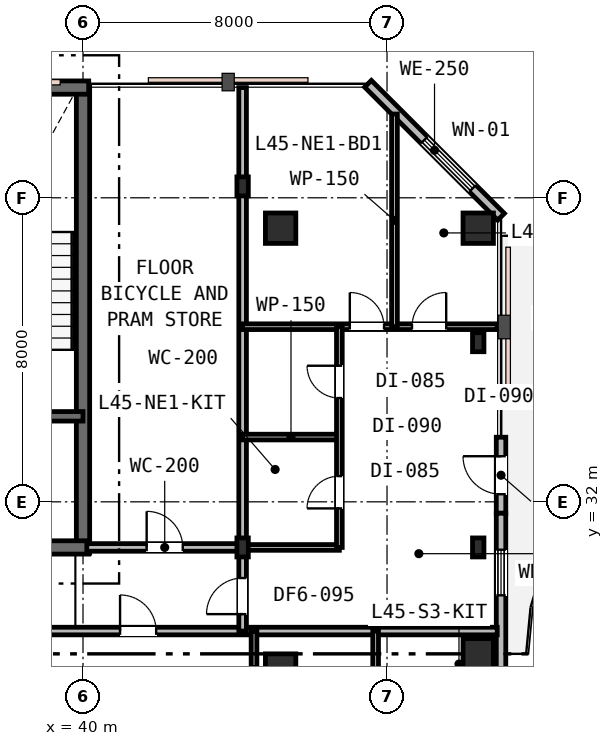
"""IFC4 building model, lengths in metres.
Left out: names, types, materials, properties, quantities, classifications, styles, units other than length and angle.
Written with IfcOpenShell. Run it as: python <this file> out.ifc"""

import sys

from ifc_helpers import new_model, si_unit, direction, frame, frame_2d, origin, origin_2d, place, context, subcontext, project, spatial, rectangle, i_section, extrude, element, fill, save


model = new_model("IFC4")
c1 = context("Model", 3, precision=1e-05, world=origin(), true_north=direction((0.0, 1.0)))
c2 = subcontext(c1, "Body", "Model", "MODEL_VIEW")
j1 = project(units=[si_unit("LENGTHUNIT", "METRE"), si_unit("PLANEANGLEUNIT", "RADIAN")], contexts=[c1])
p1 = place(None, origin())
s1 = spatial("IfcSite", under=j1, at=p1, CompositionType="ELEMENT")
p2 = place(p1, origin())
s2 = spatial("IfcBuilding", under=s1, at=p2, CompositionType="ELEMENT")
p3 = place(p2, frame((0.0, 0.0, 175.8)))
s3 = spatial("IfcBuildingStorey", under=s2, at=p3, CompositionType="ELEMENT", Elevation=175.8)
p4 = place(p3, frame((40.0, 30.65, 0.0), z_axis=(0.0, 0.0, 1.0), x_axis=(0.0, 1.0, 0.0)))
e1 = element("IfcWall", 1, at=p4, inside=s3, PredefinedType="SHEAR", context=c2, shape_type="SweptSolid", body=[
    extrude(rectangle(XDim=12.3, YDim=0.35, at=frame_2d((6.15, 0.0))), origin(), (0.0, 0.0, 1.0), 3.6),
])
p5 = place(p3, frame((15.85, 42.9, 0.0), z_axis=(0.0, 0.0, 1.0), x_axis=(1.0, 0.0, 0.0)))
e2 = element("IfcWall", 2, at=p5, inside=s3, PredefinedType="SHEAR", context=c2, shape_type="SweptSolid", body=[
    extrude(rectangle(XDim=24.3, YDim=0.35, at=frame_2d((12.15, 0.0))), origin(), (0.0, 0.0, 1.0), 3.6),
])
p6 = place(p5, frame((1.6, 0.0, 0.95)))
e3 = element("IfcOpeningElement", 3, at=p6, cuts=e2, PredefinedType="OPENING", context=c2, shape_type="SweptSolid", body=[
    extrude(rectangle(XDim=1.2, YDim=1.6, at=frame_2d((0.6, 0.8))), frame((0.0, 0.185, 0.0), z_axis=(0.0, -1.0, 0.0), x_axis=(1.0, 0.0, 0.0)), (0.0, 0.0, 1.0), 0.37),
])
p7 = place(p5, frame((16.5, 0.0, 0.95)))
e4 = element("IfcOpeningElement", 4, at=p7, cuts=e2, PredefinedType="OPENING", context=c2, shape_type="SweptSolid", body=[
    extrude(rectangle(XDim=1.2, YDim=1.6, at=frame_2d((0.6, 0.8))), frame((0.0, 0.185, 0.0), z_axis=(0.0, -1.0, 0.0), x_axis=(1.0, 0.0, 0.0)), (0.0, 0.0, 1.0), 0.37),
])
p8 = place(p5, frame((21.6, 0.0, 0.95)))
e5 = element("IfcOpeningElement", 5, at=p8, cuts=e2, PredefinedType="OPENING", context=c2, shape_type="SweptSolid", body=[
    extrude(rectangle(XDim=1.2, YDim=1.6, at=frame_2d((0.6, 0.8))), frame((0.0, 0.185, 0.0), z_axis=(0.0, -1.0, 0.0), x_axis=(1.0, 0.0, 0.0)), (0.0, 0.0, 1.0), 0.37),
])
p9 = place(p3, frame((28.95, 30.8, 0.0), z_axis=(0.0, 0.0, 1.0), x_axis=(1.0, 0.0, 0.0)))
e6 = element("IfcWall", 6, at=p9, inside=s3, PredefinedType="SHEAR", context=c2, shape_type="SweptSolid", body=[
    extrude(rectangle(XDim=11.2, YDim=0.35, at=frame_2d((5.6, 0.0))), origin(), (0.0, 0.0, 1.0), 3.6),
])
p10 = place(p9, frame((7.65, 0.0, 0.0)))
e7 = element("IfcOpeningElement", 7, at=p10, cuts=e6, PredefinedType="OPENING", context=c2, shape_type="SweptSolid", body=[
    extrude(rectangle(XDim=1.1, YDim=2.15, at=frame_2d((0.55, 1.075))), frame((0.0, 0.185, 0.0), z_axis=(0.0, -1.0, 0.0), x_axis=(1.0, 0.0, 0.0)), (0.0, 0.0, 1.0), 0.37),
])
p11 = place(p3, frame((33.95, 34.25, 0.0), z_axis=(0.0, 0.0, 1.0), x_axis=(1.0, 0.0, 0.0)))
e8 = element("IfcWall", 8, at=p11, inside=s3, PredefinedType="SHEAR", context=c2, shape_type="SweptSolid", body=[
    extrude(rectangle(XDim=6.05, YDim=0.25, at=frame_2d((3.025, 0.0))), origin(), (0.0, 0.0, 1.0), 3.6),
])
p12 = place(p11, frame((3.7, 0.0, 0.0)))
e9 = element("IfcOpeningElement", 9, at=p12, cuts=e8, PredefinedType="OPENING", context=c2, shape_type="SweptSolid", body=[
    extrude(rectangle(XDim=1.0, YDim=2.15, at=frame_2d((0.5, 1.075))), frame((0.0, 0.135, 0.0), z_axis=(0.0, -1.0, 0.0), x_axis=(1.0, 0.0, 0.0)), (0.0, 0.0, 1.0), 0.27),
])
p13 = place(p11, frame((0.55, 0.0, 0.0)))
e10 = element("IfcOpeningElement", 10, at=p13, cuts=e8, PredefinedType="OPENING", context=c2, shape_type="SweptSolid", body=[
    extrude(rectangle(XDim=1.1, YDim=2.15, at=frame_2d((0.55, 1.075))), frame((0.0, 0.135, 0.0), z_axis=(0.0, -1.0, 0.0), x_axis=(1.0, 0.0, 0.0)), (0.0, 0.0, 1.0), 0.27),
])
for number, where, z_axis, x_axis in (
    (11, (45.2, 27.6, 0.0), (0.0, 0.0, 1.0), (1.0, 0.0, 0.0)),
    (12, (45.2, 39.2, 0.0), (0.0, 0.0, 1.0), (1.0, 0.0, 0.0)),
    (13, (50.4, 28.0, 0.0), (0.0, 0.0, 1.0), (1.0, 0.0, 0.0)),
    (14, (50.4, 39.2, 0.0), (0.0, 0.0, 1.0), (1.0, 0.0, 0.0)),
):
    element("IfcColumn", number, at=place(p3, frame(where, z_axis=z_axis, x_axis=x_axis)), inside=s3, PredefinedType="COLUMN", context=c2, shape_type="SweptSolid", body=[
        extrude(rectangle(XDim=0.8, YDim=0.8, at=origin_2d()), origin(), (0.0, 0.0, 1.0), 3.6),
    ])
for number, where, z_axis, x_axis in (
    (15, (44.2, 30.8, 0.0), (0.0, 0.0, 1.0), (1.0, 0.0, 0.0)),
    (16, (44.2, 40.3, 0.0), (0.0, 0.0, 1.0), (1.0, 0.0, 0.0)),
    (17, (50.4, 30.8, 0.0), (0.0, 0.0, 1.0), (1.0, 0.0, 0.0)),
    (18, (50.4, 36.2, 0.0), (0.0, 0.0, 1.0), (1.0, 0.0, 0.0)),
):
    element("IfcColumn", number, at=place(p3, frame(where, z_axis=z_axis, x_axis=x_axis)), inside=s3, PredefinedType="COLUMN", context=c2, shape_type="SweptSolid", body=[
        extrude(i_section(OverallWidth=0.3, OverallDepth=0.5, WebThickness=0.015, FlangeThickness=0.028, FilletRadius=0.027, at=origin_2d()), origin(), (0.0, 0.0, 1.0), 3.6),
    ])
p14 = place(p3, frame((51.0, 31.7, 0.0), z_axis=(0.0, 0.0, 1.0), x_axis=(0.0, 1.0, 0.0)))
e19 = element("IfcWall", 19, at=p14, inside=s3, PredefinedType="STANDARD", context=c2, shape_type="SweptSolid", body=[
    extrude(rectangle(XDim=2.0, YDim=0.25, at=frame_2d((1.0, 0.0))), origin(), (0.0, 0.0, 1.0), 3.33),
])
p15 = place(p14, frame((0.5, 0.0, 0.0)))
e20 = element("IfcOpeningElement", 20, at=p15, cuts=e19, PredefinedType="OPENING", context=c2, shape_type="SweptSolid", body=[
    extrude(rectangle(XDim=1.0, YDim=2.15, at=frame_2d((0.5, 1.075))), frame((0.0, 0.135, 0.0), z_axis=(0.0, -1.0, 0.0), x_axis=(1.0, 0.0, 0.0)), (0.0, 0.0, 1.0), 0.27),
])
p16 = place(p3, frame((51.0, 27.5, 0.0), z_axis=(0.0, 0.0, 1.0), x_axis=(0.0, 1.0, 0.0)))
e21 = element("IfcWall", 21, at=p16, inside=s3, PredefinedType="STANDARD", context=c2, shape_type="SweptSolid", body=[
    extrude(rectangle(XDim=4.2, YDim=0.25, at=frame_2d((2.1, 0.0))), origin(), (0.0, 0.0, 1.0), 3.33),
])
p17 = place(p16, frame((2.04, 0.0, 0.85)))
e22 = element("IfcOpeningElement", 22, at=p17, cuts=e21, PredefinedType="OPENING", context=c2, shape_type="SweptSolid", body=[
    extrude(rectangle(XDim=1.2, YDim=1.6, at=frame_2d((0.6, 0.8))), frame((0.0, 0.135, 0.0), z_axis=(0.0, -1.0, 0.0), x_axis=(1.0, 0.0, 0.0)), (0.0, 0.0, 1.0), 0.27),
])
p18 = place(p3, frame((51.0, 39.5, 0.0), z_axis=(0.0, 0.0, 1.0), x_axis=(-0.707106781187, 0.707106781187, 0.0)))
e23 = element("IfcWall", 23, at=p18, inside=s3, PredefinedType="STANDARD", context=c2, shape_type="SweptSolid", body=[
    extrude(rectangle(XDim=4.95, YDim=0.25, at=frame_2d((2.475, 0.0))), origin(), (0.0, 0.0, 1.0), 3.33),
])
p19 = place(p18, frame((1.057, 0.0, 0.75)))
e24 = element("IfcOpeningElement", 24, at=p19, cuts=e23, PredefinedType="OPENING", context=c2, shape_type="SweptSolid", body=[
    extrude(rectangle(XDim=1.8, YDim=1.85, at=frame_2d((0.9, 0.925))), frame((0.0, 0.135, 0.0), z_axis=(0.0, -1.0, 0.0), x_axis=(1.0, 0.0, 0.0)), (0.0, 0.0, 1.0), 0.27),
])
p20 = place(p3, frame((21.6, 28.6, 0.0), z_axis=(0.0, 0.0, 1.0), x_axis=(1.0, 0.0, 0.0)))
e25 = element("IfcWall", 25, at=p20, inside=s3, PredefinedType="PARTITIONING", context=c2, shape_type="SweptSolid", body=[
    extrude(rectangle(XDim=29.3, YDim=0.2, at=frame_2d((14.65, 0.0))), origin(), (0.0, 0.0, 1.0), 2.92),
])
p21 = place(p20, frame((3.293, 0.0, 0.0)))
e26 = element("IfcOpeningElement", 26, at=p21, cuts=e25, PredefinedType="OPENING", context=c2, shape_type="SweptSolid", body=[
    extrude(rectangle(XDim=0.95, YDim=2.15, at=frame_2d((0.475, 1.075))), frame((0.0, 0.11, 0.0), z_axis=(0.0, -1.0, 0.0), x_axis=(1.0, 0.0, 0.0)), (0.0, 0.0, 1.0), 0.22),
])
p22 = place(p20, frame((10.493, 0.0, 0.0)))
e27 = element("IfcOpeningElement", 27, at=p22, cuts=e25, PredefinedType="OPENING", context=c2, shape_type="SweptSolid", body=[
    extrude(rectangle(XDim=0.95, YDim=2.15, at=frame_2d((0.475, 1.075))), frame((0.0, 0.11, 0.0), z_axis=(0.0, -1.0, 0.0), x_axis=(1.0, 0.0, 0.0)), (0.0, 0.0, 1.0), 0.22),
])
p23 = place(p20, frame((19.375, 0.0, 0.0)))
e28 = element("IfcOpeningElement", 28, at=p23, cuts=e25, PredefinedType="OPENING", context=c2, shape_type="SweptSolid", body=[
    extrude(rectangle(XDim=0.95, YDim=2.15, at=frame_2d((0.475, 1.075))), frame((0.0, 0.11, 0.0), z_axis=(0.0, -1.0, 0.0), x_axis=(1.0, 0.0, 0.0)), (0.0, 0.0, 1.0), 0.22),
])
p24 = place(p3, frame((40.1, 30.8, 0.0), z_axis=(0.0, 0.0, 1.0), x_axis=(1.0, 0.0, 0.0)))
e29 = element("IfcWall", 29, at=p24, inside=s3, PredefinedType="PARTITIONING", context=c2, shape_type="SweptSolid", body=[
    extrude(rectangle(XDim=4.1, YDim=0.2, at=frame_2d((2.05, 0.0))), origin(), (0.0, 0.0, 1.0), 2.92),
])
p25 = place(p24, frame((1.575, 0.0, 0.0)))
e30 = element("IfcOpeningElement", 30, at=p25, cuts=e29, PredefinedType="OPENING", context=c2, shape_type="SweptSolid", body=[
    extrude(rectangle(XDim=0.95, YDim=2.15, at=frame_2d((0.475, 1.075))), frame((0.0, 0.11, 0.0), z_axis=(0.0, -1.0, 0.0), x_axis=(1.0, 0.0, 0.0)), (0.0, 0.0, 1.0), 0.22),
])
p26 = place(p3, frame((44.2, 28.6, 0.0), z_axis=(0.0, 0.0, 1.0), x_axis=(0.0, 1.0, 0.0)))
e31 = element("IfcWall", 31, at=p26, inside=s3, PredefinedType="PARTITIONING", context=c2, shape_type="SweptSolid", body=[
    extrude(rectangle(XDim=14.3, YDim=0.2, at=frame_2d((7.15, 0.0))), origin(), (0.0, 0.0, 1.0), 2.92),
])
p27 = place(p26, frame((0.445, 0.0, 0.0)))
e32 = element("IfcOpeningElement", 32, at=p27, cuts=e31, PredefinedType="OPENING", context=c2, shape_type="SweptSolid", body=[
    extrude(rectangle(XDim=0.95, YDim=2.15, at=frame_2d((0.475, 1.075))), frame((0.0, 0.11, 0.0), z_axis=(0.0, -1.0, 0.0), x_axis=(1.0, 0.0, 0.0)), (0.0, 0.0, 1.0), 0.22),
])
for number, where, z_axis, x_axis in (
    (33, (44.2, 30.8, 0.0), (0.0, 0.0, 1.0), (1.0, 0.0, 0.0)),
    (34, (44.2, 33.704, 0.0), (0.0, 0.0, 1.0), (1.0, 0.0, 0.0)),
):
    element("IfcWall", number, at=place(p3, frame(where, z_axis=z_axis, x_axis=x_axis)), inside=s3, PredefinedType="PARTITIONING", context=c2, shape_type="SweptSolid", body=[
        extrude(rectangle(XDim=2.546, YDim=0.15, at=frame_2d((1.273, 0.0))), origin(), (0.0, 0.0, 1.0), 2.92),
    ])
p28 = place(p3, frame((44.2, 36.608, 0.0), z_axis=(0.0, 0.0, 1.0), x_axis=(1.0, 0.0, 0.0)))
e35 = element("IfcWall", 35, at=p28, inside=s3, PredefinedType="PARTITIONING", context=c2, shape_type="SweptSolid", body=[
    extrude(rectangle(XDim=6.7, YDim=0.15, at=frame_2d((3.35, 0.0))), origin(), (0.0, 0.0, 1.0), 2.92),
])
p29 = place(p28, frame((2.821, 0.0, 0.0)))
e36 = element("IfcOpeningElement", 36, at=p29, cuts=e35, PredefinedType="OPENING", context=c2, shape_type="SweptSolid", body=[
    extrude(rectangle(XDim=0.9, YDim=2.15, at=frame_2d((0.45, 1.075))), frame((0.0, 0.085, 0.0), z_axis=(0.0, -1.0, 0.0), x_axis=(1.0, 0.0, 0.0)), (0.0, 0.0, 1.0), 0.17),
])
p30 = place(p28, frame((4.457, 0.0, 0.0)))
e37 = element("IfcOpeningElement", 37, at=p30, cuts=e35, PredefinedType="OPENING", context=c2, shape_type="SweptSolid", body=[
    extrude(rectangle(XDim=0.9, YDim=2.15, at=frame_2d((0.45, 1.075))), frame((0.0, 0.085, 0.0), z_axis=(0.0, -1.0, 0.0), x_axis=(1.0, 0.0, 0.0)), (0.0, 0.0, 1.0), 0.17),
])
p31 = place(p3, frame((46.746, 30.8, 0.0), z_axis=(0.0, 0.0, 1.0), x_axis=(0.0, 1.0, 0.0)))
e38 = element("IfcWall", 38, at=p31, inside=s3, PredefinedType="PARTITIONING", context=c2, shape_type="SweptSolid", body=[
    extrude(rectangle(XDim=5.808, YDim=0.15, at=frame_2d((2.904, 0.0))), origin(), (0.0, 0.0, 1.0), 2.92),
])
p32 = place(p31, frame((1.027, 0.0, 0.0)))
e39 = element("IfcOpeningElement", 39, at=p32, cuts=e38, PredefinedType="OPENING", context=c2, shape_type="SweptSolid", body=[
    extrude(rectangle(XDim=0.85, YDim=2.15, at=frame_2d((0.425, 1.075))), frame((0.0, 0.085, 0.0), z_axis=(0.0, -1.0, 0.0), x_axis=(1.0, 0.0, 0.0)), (0.0, 0.0, 1.0), 0.17),
])
p33 = place(p31, frame((3.931, 0.0, 0.0)))
e40 = element("IfcOpeningElement", 40, at=p33, cuts=e38, PredefinedType="OPENING", context=c2, shape_type="SweptSolid", body=[
    extrude(rectangle(XDim=0.85, YDim=2.15, at=frame_2d((0.425, 1.075))), frame((0.0, 0.085, 0.0), z_axis=(0.0, -1.0, 0.0), x_axis=(1.0, 0.0, 0.0)), (0.0, 0.0, 1.0), 0.17),
])
p34 = place(p3, frame((48.196, 36.608, 0.0), z_axis=(0.0, 0.0, 1.0), x_axis=(0.0, 1.0, 0.0)))
e41 = element("IfcWall", 41, at=p34, inside=s3, PredefinedType="PARTITIONING", context=c2, shape_type="SweptSolid", body=[
    extrude(rectangle(XDim=5.596, YDim=0.15, at=frame_2d((2.798, 0.0))), origin(), (0.0, 0.0, 1.0), 3.02),
])
for number, where, z_axis, x_axis in (
    (42, (44.5, 26.576, 0.0), (0.0, 0.0, 1.0), (0.0, 1.0, 0.0)),
    (43, (47.7, 26.576, 0.0), (0.0, 0.0, 1.0), (0.0, 1.0, 0.0)),
):
    element("IfcWall", number, at=place(p3, frame(where, z_axis=z_axis, x_axis=x_axis)), inside=s3, PredefinedType="PARTITIONING", context=c2, shape_type="SweptSolid", body=[
        extrude(rectangle(XDim=2.024, YDim=0.15, at=frame_2d((1.012, 0.0))), origin(), (0.0, 0.0, 1.0), 3.33),
    ])
p35 = place(p15, origin())
e44 = element("IfcDoor", 44, at=p35, inside=s3, OperationType="SINGLE_SWING_RIGHT", PredefinedType="DOOR", context=c2, shape_type="SweptSolid", body=[
    extrude(rectangle(XDim=1.0, YDim=2.15, at=frame_2d((0.5, 1.075))), frame((0.0, 0.025, 0.0), z_axis=(0.0, -1.0, 0.0), x_axis=(1.0, 0.0, 0.0)), (0.0, 0.0, 1.0), 0.05),
])
fill(e20, e44)
p36 = place(p17, origin())
e45 = element("IfcWindow", 45, at=p36, inside=s3, PartitioningType="SINGLE_PANEL", PredefinedType="WINDOW", context=c2, shape_type="SweptSolid", body=[
    extrude(rectangle(XDim=1.2, YDim=1.6, at=frame_2d((0.6, 0.8))), frame((0.0, 0.03, 0.0), z_axis=(0.0, -1.0, 0.0), x_axis=(1.0, 0.0, 0.0)), (0.0, 0.0, 1.0), 0.06),
])
fill(e22, e45)
p37 = place(p19, origin())
e46 = element("IfcWindow", 46, at=p37, inside=s3, PartitioningType="SINGLE_PANEL", PredefinedType="WINDOW", context=c2, shape_type="SweptSolid", body=[
    extrude(rectangle(XDim=1.8, YDim=1.85, at=frame_2d((0.9, 0.925))), frame((0.0, 0.03, 0.0), z_axis=(0.0, -1.0, 0.0), x_axis=(1.0, 0.0, 0.0)), (0.0, 0.0, 1.0), 0.06),
])
fill(e24, e46)
p38 = place(p25, origin())
e47 = element("IfcDoor", 47, at=p38, inside=s3, OperationType="SINGLE_SWING_LEFT", PredefinedType="DOOR", context=c2, shape_type="SweptSolid", body=[
    extrude(rectangle(XDim=0.95, YDim=2.15, at=frame_2d((0.475, 1.075))), frame((0.0, 0.025, 0.0), z_axis=(0.0, -1.0, 0.0), x_axis=(1.0, 0.0, 0.0)), (0.0, 0.0, 1.0), 0.05),
])
fill(e30, e47)
p39 = place(p27, origin())
e48 = element("IfcDoor", 48, at=p39, inside=s3, OperationType="SINGLE_SWING_LEFT", PredefinedType="DOOR", context=c2, shape_type="SweptSolid", body=[
    extrude(rectangle(XDim=0.95, YDim=2.15, at=frame_2d((0.475, 1.075))), frame((0.0, 0.025, 0.0), z_axis=(0.0, -1.0, 0.0), x_axis=(1.0, 0.0, 0.0)), (0.0, 0.0, 1.0), 0.05),
])
fill(e32, e48)
p40 = place(p32, origin())
e49 = element("IfcDoor", 49, at=p40, inside=s3, OperationType="SINGLE_SWING_LEFT", PredefinedType="DOOR", context=c2, shape_type="SweptSolid", body=[
    extrude(rectangle(XDim=0.85, YDim=2.15, at=frame_2d((0.425, 1.075))), frame((0.0, 0.025, 0.0), z_axis=(0.0, -1.0, 0.0), x_axis=(1.0, 0.0, 0.0)), (0.0, 0.0, 1.0), 0.05),
])
fill(e39, e49)
p41 = place(p33, origin())
e50 = element("IfcDoor", 50, at=p41, inside=s3, OperationType="SINGLE_SWING_RIGHT", PredefinedType="DOOR", context=c2, shape_type="SweptSolid", body=[
    extrude(rectangle(XDim=0.85, YDim=2.15, at=frame_2d((0.425, 1.075))), frame((0.0, 0.025, 0.0), z_axis=(0.0, -1.0, 0.0), x_axis=(1.0, 0.0, 0.0)), (0.0, 0.0, 1.0), 0.05),
])
fill(e40, e50)
p42 = place(p29, origin())
e51 = element("IfcDoor", 51, at=p42, inside=s3, OperationType="SINGLE_SWING_LEFT", PredefinedType="DOOR", context=c2, shape_type="SweptSolid", body=[
    extrude(rectangle(XDim=0.9, YDim=2.15, at=frame_2d((0.45, 1.075))), frame((0.0, 0.025, 0.0), z_axis=(0.0, -1.0, 0.0), x_axis=(1.0, 0.0, 0.0)), (0.0, 0.0, 1.0), 0.05),
])
fill(e36, e51)
p43 = place(p30, origin())
e52 = element("IfcDoor", 52, at=p43, inside=s3, OperationType="SINGLE_SWING_RIGHT", PredefinedType="DOOR", context=c2, shape_type="SweptSolid", body=[
    extrude(rectangle(XDim=0.9, YDim=2.15, at=frame_2d((0.45, 1.075))), frame((0.0, 0.025, 0.0), z_axis=(0.0, -1.0, 0.0), x_axis=(1.0, 0.0, 0.0)), (0.0, 0.0, 1.0), 0.05),
])
fill(e37, e52)
p44 = place(p23, origin())
e53 = element("IfcDoor", 53, at=p44, inside=s3, OperationType="SINGLE_SWING_LEFT", PredefinedType="DOOR", context=c2, shape_type="SweptSolid", body=[
    extrude(rectangle(XDim=0.95, YDim=2.15, at=frame_2d((0.475, 1.075))), frame((0.0, 0.025, 0.0), z_axis=(0.0, -1.0, 0.0), x_axis=(1.0, 0.0, 0.0)), (0.0, 0.0, 1.0), 0.05),
])
fill(e28, e53)
save(model, sys.argv[1])
